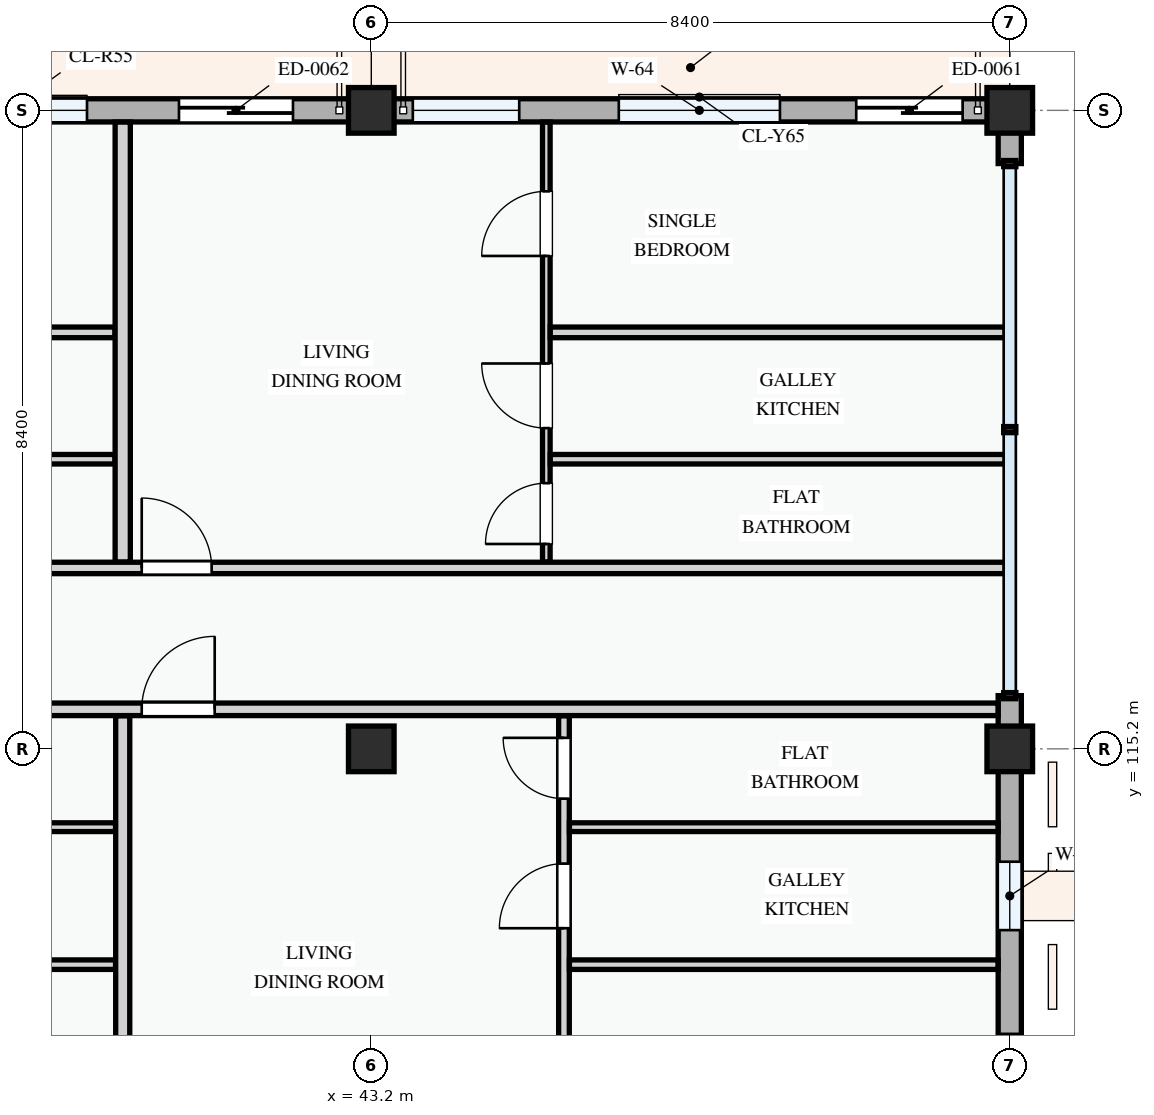
"""IFC4 building model, lengths in metres.
Left out: names, types, materials, properties, quantities, classifications, styles, units other than length and angle.
Written with IfcOpenShell. Run it as: python <this file> out.ifc"""

import sys

from ifc_helpers import new_model, si_unit, direction, frame, frame_2d, origin, origin_2d, place, context, subcontext, project, spatial, rectangle, extrude, element, fill, save


model = new_model("IFC4")
c1 = context("Model", 3, precision=1e-05, world=origin(), true_north=direction((0.0, 1.0)))
c2 = subcontext(c1, "Body", "Model", "MODEL_VIEW")
j1 = project(units=[si_unit("LENGTHUNIT", "METRE"), si_unit("PLANEANGLEUNIT", "RADIAN")], contexts=[c1])
p1 = place(None, origin())
s1 = spatial("IfcSite", under=j1, at=p1, CompositionType="ELEMENT")
p2 = place(p1, origin())
s2 = spatial("IfcBuilding", under=s1, at=p2, CompositionType="ELEMENT")
p3 = place(p2, frame((0.0, 0.0, 24.6)))
s3 = spatial("IfcBuildingStorey", under=s2, at=p3, CompositionType="ELEMENT", Elevation=24.6)
for number, where, z_axis, x_axis in (
    (1, (43.2, 115.2, 0.0), (0.0, 0.0, 1.0), (1.0, 0.0, 0.0)),
    (2, (43.2, 123.6, 0.0), (0.0, 0.0, 1.0), (1.0, 0.0, 0.0)),
    (3, (51.6, 115.2, 0.0), (0.0, 0.0, 1.0), (1.0, 0.0, 0.0)),
    (4, (51.6, 123.6, 0.0), (0.0, 0.0, 1.0), (1.0, 0.0, 0.0)),
):
    element("IfcColumn", number, at=place(p3, frame(where, z_axis=z_axis, x_axis=x_axis)), inside=s3, PredefinedType="COLUMN", context=c2, shape_type="SweptSolid", body=[
        extrude(rectangle(XDim=0.6, YDim=0.6, at=origin_2d()), origin(), (0.0, 0.0, 1.0), 3.3),
    ])
p4 = place(p3, frame((51.6, 109.2, 0.0), z_axis=(0.0, 0.0, 1.0), x_axis=(0.0, 1.0, 0.0)))
e5 = element("IfcWall", 5, at=p4, inside=s3, PredefinedType="STANDARD", context=c2, shape_type="SweptSolid", body=[
    extrude(rectangle(XDim=6.0, YDim=0.305, at=frame_2d((3.0, 0.0))), origin(), (0.0, 0.0, 1.0), 2.575),
])
p5 = place(p4, frame((1.1, 0.0, 0.78)))
e6 = element("IfcOpeningElement", 6, at=p5, cuts=e5, PredefinedType="OPENING", context=c2, shape_type="SweptSolid", body=[
    extrude(rectangle(XDim=1.15, YDim=1.25, at=frame_2d((0.575, 0.625))), frame((0.0, 0.163, 0.0), z_axis=(0.0, -1.0, 0.0), x_axis=(1.0, 0.0, 0.0)), (0.0, 0.0, 1.0), 0.325),
])
p6 = place(p4, frame((3.615, 0.0, 0.78)))
e7 = element("IfcOpeningElement", 7, at=p6, cuts=e5, PredefinedType="OPENING", context=c2, shape_type="SweptSolid", body=[
    extrude(rectangle(XDim=0.9, YDim=1.2, at=frame_2d((0.45, 0.6))), frame((0.0, 0.163, 0.0), z_axis=(0.0, -1.0, 0.0), x_axis=(1.0, 0.0, 0.0)), (0.0, 0.0, 1.0), 0.325),
])
p7 = place(p3, frame((51.6, 115.2, 0.0), z_axis=(0.0, 0.0, 1.0), x_axis=(0.0, 1.0, 0.0)))
e8 = element("IfcWall", 8, at=p7, inside=s3, PredefinedType="STANDARD", context=c2, shape_type="SweptSolid", body=[
    extrude(rectangle(XDim=0.7, YDim=0.305, at=frame_2d((0.35, 0.0))), origin(), (0.0, 0.0, 1.0), 2.425),
])
p8 = place(p3, frame((51.6, 122.9, 0.0), z_axis=(0.0, 0.0, 1.0), x_axis=(0.0, 1.0, 0.0)))
e9 = element("IfcWall", 9, at=p8, inside=s3, PredefinedType="STANDARD", context=c2, shape_type="SweptSolid", body=[
    extrude(rectangle(XDim=0.546, YDim=0.305, at=frame_2d((0.273, 0.0))), origin(), (0.0, 0.0, 1.0), 2.425),
])
p9 = place(p3, frame((51.6, 123.6, 0.0), z_axis=(0.0, 0.0, 1.0), x_axis=(-1.0, 0.0, 0.0)))
e10 = element("IfcWall", 10, at=p9, inside=s3, PredefinedType="STANDARD", context=c2, shape_type="SweptSolid", body=[
    extrude(rectangle(XDim=8.4, YDim=0.305, at=frame_2d((4.2, 0.0))), origin(), (0.0, 0.0, 1.0), 2.375),
])
p10 = place(p9, frame((0.62, 0.0, 0.0)))
e11 = element("IfcOpeningElement", 11, at=p10, cuts=e10, PredefinedType="OPENING", context=c2, shape_type="SweptSolid", body=[
    extrude(rectangle(XDim=1.4, YDim=2.2, at=frame_2d((0.7, 1.1))), frame((0.0, 0.163, 0.0), z_axis=(0.0, -1.0, 0.0), x_axis=(1.0, 0.0, 0.0)), (0.0, 0.0, 1.0), 0.325),
])
p11 = place(p9, frame((3.024, 0.0, 0.78)))
e12 = element("IfcOpeningElement", 12, at=p11, cuts=e10, PredefinedType="OPENING", context=c2, shape_type="SweptSolid", body=[
    extrude(rectangle(XDim=2.12, YDim=1.44, at=frame_2d((1.06, 0.72))), frame((0.0, 0.163, 0.0), z_axis=(0.0, -1.0, 0.0), x_axis=(1.0, 0.0, 0.0)), (0.0, 0.0, 1.0), 0.325),
])
p12 = place(p9, frame((6.454, 0.0, 0.78)))
e13 = element("IfcOpeningElement", 13, at=p12, cuts=e10, PredefinedType="OPENING", context=c2, shape_type="SweptSolid", body=[
    extrude(rectangle(XDim=1.4, YDim=1.45, at=frame_2d((0.7, 0.725))), frame((0.0, 0.163, 0.0), z_axis=(0.0, -1.0, 0.0), x_axis=(1.0, 0.0, 0.0)), (0.0, 0.0, 1.0), 0.325),
])
p13 = place(p3, frame((43.2, 123.6, 0.0), z_axis=(0.0, 0.0, 1.0), x_axis=(-1.0, 0.0, 0.0)))
e14 = element("IfcWall", 14, at=p13, inside=s3, PredefinedType="STANDARD", context=c2, shape_type="SweptSolid", body=[
    extrude(rectangle(XDim=6.0, YDim=0.305, at=frame_2d((3.0, 0.0))), origin(), (0.0, 0.0, 1.0), 2.475),
])
p14 = place(p13, frame((1.03, 0.0, 0.0)))
e15 = element("IfcOpeningElement", 15, at=p14, cuts=e14, PredefinedType="OPENING", context=c2, shape_type="SweptSolid", body=[
    extrude(rectangle(XDim=1.5, YDim=2.2, at=frame_2d((0.75, 1.1))), frame((0.0, 0.163, 0.0), z_axis=(0.0, -1.0, 0.0), x_axis=(1.0, 0.0, 0.0)), (0.0, 0.0, 1.0), 0.325),
])
p15 = place(p13, frame((3.74, 0.0, 0.78)))
e16 = element("IfcOpeningElement", 16, at=p15, cuts=e14, PredefinedType="OPENING", context=c2, shape_type="SweptSolid", body=[
    extrude(rectangle(XDim=1.6, YDim=1.55, at=frame_2d((0.8, 0.775))), frame((0.0, 0.163, 0.0), z_axis=(0.0, -1.0, 0.0), x_axis=(1.0, 0.0, 0.0)), (0.0, 0.0, 1.0), 0.325),
])
p16 = place(p3, frame((35.507, 112.361, 0.0), z_axis=(0.0, 0.0, 1.0), x_axis=(1.0, 0.0, 0.0)))
e17 = element("IfcWall", 17, at=p16, inside=s3, PredefinedType="PARTITIONING", context=c2, shape_type="SweptSolid", body=[
    extrude(rectangle(XDim=4.328, YDim=0.125, at=frame_2d((2.164, 0.0))), origin(), (0.0, 0.0, 1.0), 3.0),
])
p17 = place(p3, frame((35.507, 114.17, 0.0), z_axis=(0.0, 0.0, 1.0), x_axis=(1.0, 0.0, 0.0)))
e18 = element("IfcWall", 18, at=p17, inside=s3, PredefinedType="PARTITIONING", context=c2, shape_type="SweptSolid", body=[
    extrude(rectangle(XDim=4.328, YDim=0.115, at=frame_2d((2.164, 0.0))), origin(), (0.0, 0.0, 1.0), 3.0),
])
p18 = place(p3, frame((35.439, 120.679, 0.0), z_axis=(0.0, 0.0, 1.0), x_axis=(1.0, 0.0, 0.0)))
e19 = element("IfcWall", 19, at=p18, inside=s3, PredefinedType="PARTITIONING", context=c2, shape_type="SweptSolid", body=[
    extrude(rectangle(XDim=4.389, YDim=0.14, at=frame_2d((2.194, 0.0))), origin(), (0.0, 0.0, 1.0), 3.0),
])
p19 = place(p3, frame((35.439, 119.01, 0.0), z_axis=(0.0, 0.0, 1.0), x_axis=(1.0, 0.0, 0.0)))
e20 = element("IfcWall", 20, at=p19, inside=s3, PredefinedType="PARTITIONING", context=c2, shape_type="SweptSolid", body=[
    extrude(rectangle(XDim=4.389, YDim=0.125, at=frame_2d((2.194, 0.0))), origin(), (0.0, 0.0, 1.0), 3.0),
])
p20 = place(p3, frame((45.735, 109.354, 0.0), z_axis=(0.0, 0.0, 1.0), x_axis=(0.0, 1.0, 0.0)))
e21 = element("IfcWall", 21, at=p20, inside=s3, PredefinedType="PARTITIONING", context=c2, shape_type="SweptSolid", body=[
    extrude(rectangle(XDim=6.281, YDim=0.14, at=frame_2d((3.141, 0.0))), origin(), (0.0, 0.0, 1.0), 3.0),
])
p21 = place(p20, frame((1.031, 0.0, 0.0)))
e22 = element("IfcOpeningElement", 22, at=p21, cuts=e21, PredefinedType="OPENING", context=c2, shape_type="SweptSolid", body=[
    extrude(rectangle(XDim=0.85, YDim=2.1, at=frame_2d((0.425, 1.05))), frame((0.0, 0.08, 0.0), z_axis=(0.0, -1.0, 0.0), x_axis=(1.0, 0.0, 0.0)), (0.0, 0.0, 1.0), 0.16),
])
p22 = place(p20, frame((3.486, 0.0, 0.0)))
e23 = element("IfcOpeningElement", 23, at=p22, cuts=e21, PredefinedType="OPENING", context=c2, shape_type="SweptSolid", body=[
    extrude(rectangle(XDim=0.85, YDim=2.1, at=frame_2d((0.425, 1.05))), frame((0.0, 0.08, 0.0), z_axis=(0.0, -1.0, 0.0), x_axis=(1.0, 0.0, 0.0)), (0.0, 0.0, 1.0), 0.16),
])
p23 = place(p20, frame((5.19, 0.0, 0.0)))
e24 = element("IfcOpeningElement", 24, at=p23, cuts=e21, PredefinedType="OPENING", context=c2, shape_type="SweptSolid", body=[
    extrude(rectangle(XDim=0.8, YDim=2.1, at=frame_2d((0.4, 1.05))), frame((0.0, 0.08, 0.0), z_axis=(0.0, -1.0, 0.0), x_axis=(1.0, 0.0, 0.0)), (0.0, 0.0, 1.0), 0.16),
])
p24 = place(p3, frame((45.807, 112.361, 0.0), z_axis=(0.0, 0.0, 1.0), x_axis=(1.0, 0.0, 0.0)))
e25 = element("IfcWall", 25, at=p24, inside=s3, PredefinedType="PARTITIONING", context=c2, shape_type="SweptSolid", body=[
    extrude(rectangle(XDim=5.639, YDim=0.125, at=frame_2d((2.819, 0.0))), origin(), (0.0, 0.0, 1.0), 3.0),
])
p25 = place(p3, frame((45.807, 114.17, 0.0), z_axis=(0.0, 0.0, 1.0), x_axis=(1.0, 0.0, 0.0)))
e26 = element("IfcWall", 26, at=p25, inside=s3, PredefinedType="PARTITIONING", context=c2, shape_type="SweptSolid", body=[
    extrude(rectangle(XDim=5.639, YDim=0.115, at=frame_2d((2.819, 0.0))), origin(), (0.0, 0.0, 1.0), 3.0),
])
p26 = place(p3, frame((45.503, 117.657, 0.0), z_axis=(0.0, 0.0, 1.0), x_axis=(0.0, 1.0, 0.0)))
e27 = element("IfcWall", 27, at=p26, inside=s3, PredefinedType="PARTITIONING", context=c2, shape_type="SweptSolid", body=[
    extrude(rectangle(XDim=5.789, YDim=0.1, at=frame_2d((2.894, 0.0))), origin(), (0.0, 0.0, 1.0), 3.0),
])
p27 = place(p26, frame((0.238, 0.0, 0.0)))
e28 = element("IfcOpeningElement", 28, at=p27, cuts=e27, PredefinedType="OPENING", context=c2, shape_type="SweptSolid", body=[
    extrude(rectangle(XDim=0.8, YDim=2.1, at=frame_2d((0.4, 1.05))), frame((0.0, 0.06, 0.0), z_axis=(0.0, -1.0, 0.0), x_axis=(1.0, 0.0, 0.0)), (0.0, 0.0, 1.0), 0.12),
])
p28 = place(p26, frame((1.763, 0.0, 0.0)))
e29 = element("IfcOpeningElement", 29, at=p28, cuts=e27, PredefinedType="OPENING", context=c2, shape_type="SweptSolid", body=[
    extrude(rectangle(XDim=0.85, YDim=2.1, at=frame_2d((0.425, 1.05))), frame((0.0, 0.06, 0.0), z_axis=(0.0, -1.0, 0.0), x_axis=(1.0, 0.0, 0.0)), (0.0, 0.0, 1.0), 0.12),
])
p29 = place(p26, frame((4.028, 0.0, 0.0)))
e30 = element("IfcOpeningElement", 30, at=p29, cuts=e27, PredefinedType="OPENING", context=c2, shape_type="SweptSolid", body=[
    extrude(rectangle(XDim=0.85, YDim=2.1, at=frame_2d((0.425, 1.05))), frame((0.0, 0.06, 0.0), z_axis=(0.0, -1.0, 0.0), x_axis=(1.0, 0.0, 0.0)), (0.0, 0.0, 1.0), 0.12),
])
p30 = place(p3, frame((45.555, 120.679, 0.0), z_axis=(0.0, 0.0, 1.0), x_axis=(1.0, 0.0, 0.0)))
e31 = element("IfcWall", 31, at=p30, inside=s3, PredefinedType="PARTITIONING", context=c2, shape_type="SweptSolid", body=[
    extrude(rectangle(XDim=5.985, YDim=0.14, at=frame_2d((2.993, 0.0))), origin(), (0.0, 0.0, 1.0), 3.0),
])
p31 = place(p3, frame((45.555, 119.01, 0.0), z_axis=(0.0, 0.0, 1.0), x_axis=(1.0, 0.0, 0.0)))
e32 = element("IfcWall", 32, at=p31, inside=s3, PredefinedType="PARTITIONING", context=c2, shape_type="SweptSolid", body=[
    extrude(rectangle(XDim=5.985, YDim=0.125, at=frame_2d((2.993, 0.0))), origin(), (0.0, 0.0, 1.0), 3.0),
])
p32 = place(p3, frame((39.93, 109.354, 0.0), z_axis=(0.0, 0.0, 1.0), x_axis=(0.0, 1.0, 0.0)))
e33 = element("IfcWall", 33, at=p32, inside=s3, PredefinedType="PARTITIONING", context=c2, shape_type="SweptSolid", body=[
    extrude(rectangle(XDim=6.281, YDim=0.185, at=frame_2d((3.141, 0.0))), origin(), (0.0, 0.0, 1.0), 3.0),
])
p33 = place(p3, frame((39.93, 117.657, 0.0), z_axis=(0.0, 0.0, 1.0), x_axis=(0.0, 1.0, 0.0)))
e34 = element("IfcWall", 34, at=p33, inside=s3, PredefinedType="PARTITIONING", context=c2, shape_type="SweptSolid", body=[
    extrude(rectangle(XDim=5.789, YDim=0.2, at=frame_2d((2.894, 0.0))), origin(), (0.0, 0.0, 1.0), 3.0),
])
p34 = place(p3, frame((25.15, 115.72, 0.0), z_axis=(0.0, 0.0, 1.0), x_axis=(1.0, 0.0, 0.0)))
e35 = element("IfcWall", 35, at=p34, inside=s3, PredefinedType="PARTITIONING", context=c2, shape_type="SweptSolid", body=[
    extrude(rectangle(XDim=26.296, YDim=0.165, at=frame_2d((13.148, 0.0))), origin(), (0.0, 0.0, 1.0), 3.0),
])
p35 = place(p34, frame((0.25, 0.0, 0.0)))
e36 = element("IfcOpeningElement", 36, at=p35, cuts=e35, PredefinedType="OPENING", context=c2, shape_type="SweptSolid", body=[
    extrude(rectangle(XDim=0.92, YDim=2.1, at=frame_2d((0.46, 1.05))), frame((0.0, 0.093, 0.0), z_axis=(0.0, -1.0, 0.0), x_axis=(1.0, 0.0, 0.0)), (0.0, 0.0, 1.0), 0.185),
])
p36 = place(p34, frame((7.64, 0.0, 0.0)))
e37 = element("IfcOpeningElement", 37, at=p36, cuts=e35, PredefinedType="OPENING", context=c2, shape_type="SweptSolid", body=[
    extrude(rectangle(XDim=0.92, YDim=2.1, at=frame_2d((0.46, 1.05))), frame((0.0, 0.093, 0.0), z_axis=(0.0, -1.0, 0.0), x_axis=(1.0, 0.0, 0.0)), (0.0, 0.0, 1.0), 0.185),
])
p37 = place(p34, frame((15.03, 0.0, 0.0)))
e38 = element("IfcOpeningElement", 38, at=p37, cuts=e35, PredefinedType="OPENING", context=c2, shape_type="SweptSolid", body=[
    extrude(rectangle(XDim=0.96, YDim=2.12, at=frame_2d((0.48, 1.06))), frame((0.0, 0.093, 0.0), z_axis=(0.0, -1.0, 0.0), x_axis=(1.0, 0.0, 0.0)), (0.0, 0.0, 1.0), 0.185),
])
p38 = place(p3, frame((22.66, 117.58, 0.0), z_axis=(0.0, 0.0, 1.0), x_axis=(1.0, 0.0, 0.0)))
e39 = element("IfcWall", 39, at=p38, inside=s3, PredefinedType="PARTITIONING", context=c2, shape_type="SweptSolid", body=[
    extrude(rectangle(XDim=28.88, YDim=0.15, at=frame_2d((14.44, 0.0))), origin(), (0.0, 0.0, 1.0), 3.0),
])
p39 = place(p38, frame((2.74, 0.0, 0.0)))
e40 = element("IfcOpeningElement", 40, at=p39, cuts=e39, PredefinedType="OPENING", context=c2, shape_type="SweptSolid", body=[
    extrude(rectangle(XDim=0.92, YDim=2.1, at=frame_2d((0.46, 1.05))), frame((0.0, 0.085, 0.0), z_axis=(0.0, -1.0, 0.0), x_axis=(1.0, 0.0, 0.0)), (0.0, 0.0, 1.0), 0.17),
])
p40 = place(p38, frame((10.13, 0.0, 0.0)))
e41 = element("IfcOpeningElement", 41, at=p40, cuts=e39, PredefinedType="OPENING", context=c2, shape_type="SweptSolid", body=[
    extrude(rectangle(XDim=0.92, YDim=2.1, at=frame_2d((0.46, 1.05))), frame((0.0, 0.085, 0.0), z_axis=(0.0, -1.0, 0.0), x_axis=(1.0, 0.0, 0.0)), (0.0, 0.0, 1.0), 0.17),
])
p41 = place(p38, frame((17.52, 0.0, 0.0)))
e42 = element("IfcOpeningElement", 42, at=p41, cuts=e39, PredefinedType="OPENING", context=c2, shape_type="SweptSolid", body=[
    extrude(rectangle(XDim=0.92, YDim=2.1, at=frame_2d((0.46, 1.05))), frame((0.0, 0.085, 0.0), z_axis=(0.0, -1.0, 0.0), x_axis=(1.0, 0.0, 0.0)), (0.0, 0.0, 1.0), 0.17),
])
p42 = place(p5, origin())
e43 = element("IfcWindow", 43, at=p42, inside=s3, PartitioningType="SINGLE_PANEL", PredefinedType="WINDOW", context=c2, shape_type="SweptSolid", body=[
    extrude(rectangle(XDim=1.15, YDim=1.25, at=frame_2d((0.575, 0.625))), frame((0.0, 0.03, 0.0), z_axis=(0.0, -1.0, 0.0), x_axis=(1.0, 0.0, 0.0)), (0.0, 0.0, 1.0), 0.06),
])
fill(e6, e43)
p43 = place(p6, origin())
e44 = element("IfcWindow", 44, at=p43, inside=s3, PartitioningType="SINGLE_PANEL", PredefinedType="WINDOW", context=c2, shape_type="SweptSolid", body=[
    extrude(rectangle(XDim=0.9, YDim=1.2, at=frame_2d((0.45, 0.6))), frame((0.0, 0.03, 0.0), z_axis=(0.0, -1.0, 0.0), x_axis=(1.0, 0.0, 0.0)), (0.0, 0.0, 1.0), 0.06),
])
fill(e7, e44)
p44 = place(p10, frame((1.4, 0.0, 0.0), z_axis=(0.0, 0.0, 1.0), x_axis=(-1.0, 0.0, 0.0)))
e45 = element("IfcDoor", 45, at=p44, inside=s3, OperationType="SLIDING_TO_LEFT", PredefinedType="DOOR", context=c2, shape_type="SweptSolid", body=[
    extrude(rectangle(XDim=1.4, YDim=2.2, at=frame_2d((0.7, 1.1))), frame((0.0, 0.025, 0.0), z_axis=(0.0, -1.0, 0.0), x_axis=(1.0, 0.0, 0.0)), (0.0, 0.0, 1.0), 0.05),
])
fill(e11, e45)
p45 = place(p11, origin())
e46 = element("IfcWindow", 46, at=p45, inside=s3, PartitioningType="DOUBLE_PANEL_VERTICAL", PredefinedType="WINDOW", context=c2, shape_type="SweptSolid", body=[
    extrude(rectangle(XDim=2.12, YDim=1.44, at=frame_2d((1.06, 0.72))), frame((0.0, 0.03, 0.0), z_axis=(0.0, -1.0, 0.0), x_axis=(1.0, 0.0, 0.0)), (0.0, 0.0, 1.0), 0.06),
])
fill(e12, e46)
p46 = place(p12, origin())
e47 = element("IfcWindow", 47, at=p46, inside=s3, PartitioningType="SINGLE_PANEL", PredefinedType="WINDOW", context=c2, shape_type="SweptSolid", body=[
    extrude(rectangle(XDim=1.4, YDim=1.45, at=frame_2d((0.7, 0.725))), frame((0.0, 0.03, 0.0), z_axis=(0.0, -1.0, 0.0), x_axis=(1.0, 0.0, 0.0)), (0.0, 0.0, 1.0), 0.06),
])
fill(e13, e47)
p47 = place(p14, frame((1.5, 0.0, 0.0), z_axis=(0.0, 0.0, 1.0), x_axis=(-1.0, 0.0, 0.0)))
e48 = element("IfcDoor", 48, at=p47, inside=s3, OperationType="SLIDING_TO_RIGHT", PredefinedType="DOOR", context=c2, shape_type="SweptSolid", body=[
    extrude(rectangle(XDim=1.5, YDim=2.2, at=frame_2d((0.75, 1.1))), frame((0.0, 0.025, 0.0), z_axis=(0.0, -1.0, 0.0), x_axis=(1.0, 0.0, 0.0)), (0.0, 0.0, 1.0), 0.05),
])
fill(e15, e48)
p48 = place(p15, origin())
e49 = element("IfcWindow", 49, at=p48, inside=s3, PartitioningType="DOUBLE_PANEL_VERTICAL", PredefinedType="WINDOW", context=c2, shape_type="SweptSolid", body=[
    extrude(rectangle(XDim=1.6, YDim=1.55, at=frame_2d((0.8, 0.775))), frame((0.0, 0.03, 0.0), z_axis=(0.0, -1.0, 0.0), x_axis=(1.0, 0.0, 0.0)), (0.0, 0.0, 1.0), 0.06),
])
fill(e16, e49)
p49 = place(p22, origin())
e50 = element("IfcDoor", 50, at=p49, inside=s3, OperationType="SINGLE_SWING_LEFT", PredefinedType="DOOR", context=c2, shape_type="SweptSolid", body=[
    extrude(rectangle(XDim=0.85, YDim=2.1, at=frame_2d((0.425, 1.05))), frame((0.0, 0.025, 0.0), z_axis=(0.0, -1.0, 0.0), x_axis=(1.0, 0.0, 0.0)), (0.0, 0.0, 1.0), 0.05),
])
fill(e23, e50)
p50 = place(p23, origin())
e51 = element("IfcDoor", 51, at=p50, inside=s3, OperationType="SINGLE_SWING_RIGHT", PredefinedType="DOOR", context=c2, shape_type="SweptSolid", body=[
    extrude(rectangle(XDim=0.8, YDim=2.1, at=frame_2d((0.4, 1.05))), frame((0.0, 0.025, 0.0), z_axis=(0.0, -1.0, 0.0), x_axis=(1.0, 0.0, 0.0)), (0.0, 0.0, 1.0), 0.05),
])
fill(e24, e51)
p51 = place(p27, origin())
e52 = element("IfcDoor", 52, at=p51, inside=s3, OperationType="SINGLE_SWING_LEFT", PredefinedType="DOOR", context=c2, shape_type="SweptSolid", body=[
    extrude(rectangle(XDim=0.8, YDim=2.1, at=frame_2d((0.4, 1.05))), frame((0.0, 0.025, 0.0), z_axis=(0.0, -1.0, 0.0), x_axis=(1.0, 0.0, 0.0)), (0.0, 0.0, 1.0), 0.05),
])
fill(e28, e52)
p52 = place(p28, origin())
e53 = element("IfcDoor", 53, at=p52, inside=s3, OperationType="SINGLE_SWING_RIGHT", PredefinedType="DOOR", context=c2, shape_type="SweptSolid", body=[
    extrude(rectangle(XDim=0.85, YDim=2.1, at=frame_2d((0.425, 1.05))), frame((0.0, 0.025, 0.0), z_axis=(0.0, -1.0, 0.0), x_axis=(1.0, 0.0, 0.0)), (0.0, 0.0, 1.0), 0.05),
])
fill(e29, e53)
p53 = place(p29, origin())
e54 = element("IfcDoor", 54, at=p53, inside=s3, OperationType="SINGLE_SWING_LEFT", PredefinedType="DOOR", context=c2, shape_type="SweptSolid", body=[
    extrude(rectangle(XDim=0.85, YDim=2.1, at=frame_2d((0.425, 1.05))), frame((0.0, 0.025, 0.0), z_axis=(0.0, -1.0, 0.0), x_axis=(1.0, 0.0, 0.0)), (0.0, 0.0, 1.0), 0.05),
])
fill(e30, e54)
p54 = place(p37, origin())
e55 = element("IfcDoor", 55, at=p54, inside=s3, OperationType="SINGLE_SWING_RIGHT", PredefinedType="DOOR", context=c2, shape_type="SweptSolid", body=[
    extrude(rectangle(XDim=0.96, YDim=2.12, at=frame_2d((0.48, 1.06))), frame((0.0, 0.025, 0.0), z_axis=(0.0, -1.0, 0.0), x_axis=(1.0, 0.0, 0.0)), (0.0, 0.0, 1.0), 0.05),
])
fill(e38, e55)
p55 = place(p41, origin())
e56 = element("IfcDoor", 56, at=p55, inside=s3, OperationType="SINGLE_SWING_LEFT", PredefinedType="DOOR", context=c2, shape_type="SweptSolid", body=[
    extrude(rectangle(XDim=0.92, YDim=2.1, at=frame_2d((0.46, 1.05))), frame((0.0, 0.025, 0.0), z_axis=(0.0, -1.0, 0.0), x_axis=(1.0, 0.0, 0.0)), (0.0, 0.0, 1.0), 0.05),
])
fill(e42, e56)
save(model, sys.argv[1])
